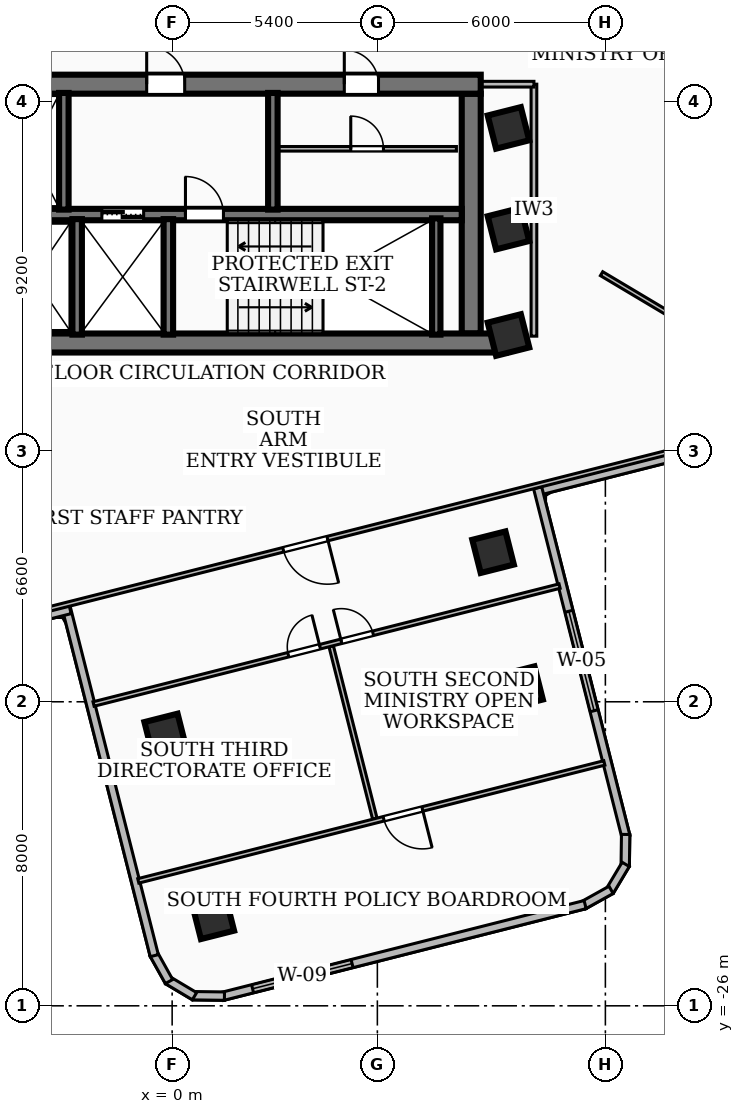
"""IFC4 building model, lengths in metres.
Left out: names, types, materials, properties, quantities, classifications, styles, units other than length and angle.
Written with IfcOpenShell. Run it as: python <this file> out.ifc"""

import sys

from ifc_helpers import new_model, si_unit, direction, frame, frame_2d, origin, origin_2d, place, context, subcontext, project, spatial, rectangle, extrude, element, fill, save


model = new_model("IFC4")
c1 = context("Model", 3, precision=1e-05, world=origin(), true_north=direction((0.0, 1.0)))
c2 = subcontext(c1, "Body", "Model", "MODEL_VIEW")
j1 = project(units=[si_unit("LENGTHUNIT", "METRE"), si_unit("PLANEANGLEUNIT", "RADIAN")], contexts=[c1])
p1 = place(None, origin())
s1 = spatial("IfcSite", under=j1, at=p1, CompositionType="ELEMENT")
p2 = place(p1, origin())
s2 = spatial("IfcBuilding", under=s1, at=p2, CompositionType="ELEMENT")
p3 = place(p2, frame((0.0, 0.0, 127.08)))
s3 = spatial("IfcBuildingStorey", under=s2, at=p3, CompositionType="ELEMENT", Elevation=127.08)
p4 = place(p3, frame((8.78, -8.56, 0.0), z_axis=(0.0, 0.0, 1.0), x_axis=(-1.0, 0.0, 0.0)))
e1 = element("IfcWall", 1, at=p4, inside=s3, PredefinedType="SHEAR", context=c2, shape_type="SweptSolid", body=[
    extrude(rectangle(XDim=17.56, YDim=0.5, at=frame_2d((8.78, 0.0))), origin(), (0.0, 0.0, 1.0), 3.34),
])
p5 = place(p3, frame((-8.12, -1.75, 0.0), z_axis=(0.0, 0.0, 1.0), x_axis=(1.0, 0.0, 0.0)))
e2 = element("IfcWall", 2, at=p5, inside=s3, PredefinedType="SHEAR", context=c2, shape_type="SweptSolid", body=[
    extrude(rectangle(XDim=16.24, YDim=0.5, at=frame_2d((8.12, 0.0))), origin(), (0.0, 0.0, 1.0), 3.34),
])
p6 = place(p5, frame((7.45, 0.0, 0.0)))
e3 = element("IfcOpeningElement", 3, at=p6, cuts=e2, PredefinedType="OPENING", context=c2, shape_type="SweptSolid", body=[
    extrude(rectangle(XDim=1.0, YDim=2.1, at=frame_2d((0.5, 1.05))), frame((0.0, 0.26, 0.0), z_axis=(0.0, -1.0, 0.0), x_axis=(1.0, 0.0, 0.0)), (0.0, 0.0, 1.0), 0.52),
])
p7 = place(p5, frame((12.65, 0.0, 0.0)))
e4 = element("IfcOpeningElement", 4, at=p7, cuts=e2, PredefinedType="OPENING", context=c2, shape_type="SweptSolid", body=[
    extrude(rectangle(XDim=0.9, YDim=2.06, at=frame_2d((0.45, 1.03))), frame((0.0, 0.26, 0.0), z_axis=(0.0, -1.0, 0.0), x_axis=(1.0, 0.0, 0.0)), (0.0, 0.0, 1.0), 0.52),
])
p8 = place(p5, frame((0.565, 0.0, 0.0)))
e5 = element("IfcOpeningElement", 5, at=p8, cuts=e2, PredefinedType="OPENING", context=c2, shape_type="SweptSolid", body=[
    extrude(rectangle(XDim=1.05, YDim=2.15, at=frame_2d((0.525, 1.075))), frame((0.0, 0.26, 0.0), z_axis=(0.0, -1.0, 0.0), x_axis=(1.0, 0.0, 0.0)), (0.0, 0.0, 1.0), 0.52),
])
p9 = place(p5, frame((2.125, 0.0, 0.0)))
e6 = element("IfcOpeningElement", 6, at=p9, cuts=e2, PredefinedType="OPENING", context=c2, shape_type="SweptSolid", body=[
    extrude(rectangle(XDim=1.05, YDim=2.15, at=frame_2d((0.525, 1.075))), frame((0.0, 0.26, 0.0), z_axis=(0.0, -1.0, 0.0), x_axis=(1.0, 0.0, 0.0)), (0.0, 0.0, 1.0), 0.52),
])
p10 = place(p5, frame((3.685, 0.0, 0.0)))
e7 = element("IfcOpeningElement", 7, at=p10, cuts=e2, PredefinedType="OPENING", context=c2, shape_type="SweptSolid", body=[
    extrude(rectangle(XDim=1.05, YDim=2.15, at=frame_2d((0.525, 1.075))), frame((0.0, 0.26, 0.0), z_axis=(0.0, -1.0, 0.0), x_axis=(1.0, 0.0, 0.0)), (0.0, 0.0, 1.0), 0.52),
])
p11 = place(p3, frame((7.87, -2.0, 0.0), z_axis=(0.0, 0.0, 1.0), x_axis=(0.0, -1.0, 0.0)))
e8 = element("IfcWall", 8, at=p11, inside=s3, PredefinedType="SHEAR", context=c2, shape_type="SweptSolid", body=[
    extrude(rectangle(XDim=6.31, YDim=0.5, at=frame_2d((3.155, 0.0))), origin(), (0.0, 0.0, 1.0), 3.34),
])
p12 = place(p3, frame((-7.62, -5.18, 0.0), z_axis=(0.0, 0.0, 1.0), x_axis=(1.0, 0.0, 0.0)))
e9 = element("IfcWall", 9, at=p12, inside=s3, PredefinedType="SOLIDWALL", context=c2, shape_type="SweptSolid", body=[
    extrude(rectangle(XDim=15.24, YDim=0.3, at=frame_2d((7.62, 0.0))), origin(), (0.0, 0.0, 1.0), 3.34),
])
p13 = place(p12, frame((5.77, 0.0, 0.0)))
e10 = element("IfcOpeningElement", 10, at=p13, cuts=e9, PredefinedType="OPENING", context=c2, shape_type="SweptSolid", body=[
    extrude(rectangle(XDim=1.1, YDim=2.15, at=frame_2d((0.55, 1.075))), frame((0.0, 0.16, 0.0), z_axis=(0.0, -1.0, 0.0), x_axis=(1.0, 0.0, 0.0)), (0.0, 0.0, 1.0), 0.32),
])
p14 = place(p12, frame((7.97, 0.0, 0.0)))
e11 = element("IfcOpeningElement", 11, at=p14, cuts=e9, PredefinedType="OPENING", context=c2, shape_type="SweptSolid", body=[
    extrude(rectangle(XDim=1.0, YDim=2.1, at=frame_2d((0.5, 1.05))), frame((0.0, 0.16, 0.0), z_axis=(0.0, -1.0, 0.0), x_axis=(1.0, 0.0, 0.0)), (0.0, 0.0, 1.0), 0.32),
])
p15 = place(p3, frame((6.95, -8.34, 0.0), z_axis=(0.0, 0.0, 1.0), x_axis=(0.0, 1.0, 0.0)))
e12 = element("IfcWall", 12, at=p15, inside=s3, PredefinedType="SOLIDWALL", context=c2, shape_type="SweptSolid", body=[
    extrude(rectangle(XDim=3.06, YDim=0.22, at=frame_2d((1.53, 0.0))), origin(), (0.0, 0.0, 1.0), 3.34),
])
for number, where, z_axis, x_axis in (
    (13, (-0.1, -8.34, 0.0), (0.0, 0.0, 1.0), (0.0, 1.0, 0.0)),
    (14, (-2.5, -8.34, 0.0), (0.0, 0.0, 1.0), (0.0, 1.0, 0.0)),
):
    element("IfcWall", number, at=place(p3, frame(where, z_axis=z_axis, x_axis=x_axis)), inside=s3, PredefinedType="SOLIDWALL", context=c2, shape_type="SweptSolid", body=[
        extrude(rectangle(XDim=3.04, YDim=0.25, at=frame_2d((1.52, 0.0))), origin(), (0.0, 0.0, 1.0), 3.34),
    ])
for number, where, z_axis, x_axis in (
    (15, (-2.85, -5.05, 0.0), (0.0, 0.0, 1.0), (0.0, 1.0, 0.0)),
    (16, (2.65, -5.05, 0.0), (0.0, 0.0, 1.0), (0.0, 1.0, 0.0)),
):
    element("IfcWall", number, at=place(p3, frame(where, z_axis=z_axis, x_axis=x_axis)), inside=s3, PredefinedType="SOLIDWALL", context=c2, shape_type="SweptSolid", body=[
        extrude(rectangle(XDim=3.07, YDim=0.25, at=frame_2d((1.535, 0.0))), origin(), (0.0, 0.0, 1.0), 3.34),
    ])
for number, where, z_axis, x_axis in (
    (17, (8.85, -5.55, 0.0), (0.0, 0.0, 1.0), (0.969, 0.245, 0.0)),
    (18, (8.85, -2.9, 0.0), (0.0, 0.0, 1.0), (0.969, 0.245, 0.0)),
    (19, (8.85, -8.35, 0.0), (0.0, 0.0, 1.0), (0.969, 0.245, 0.0)),
    (20, (-0.183, -18.86, 0.0), (0.0, 0.0, 1.0), (0.969, 0.245, 0.0)),
    (21, (8.445, -14.064, 0.0), (0.0, 0.0, 1.0), (0.969, 0.245, 0.0)),
    (22, (1.083, -23.697, 0.0), (0.0, 0.0, 1.0), (0.969, 0.245, 0.0)),
    (23, (9.208, -17.615, 0.0), (0.0, 0.0, 1.0), (0.969, 0.245, 0.0)),
):
    element("IfcColumn", number, at=place(p3, frame(where, z_axis=z_axis, x_axis=x_axis)), inside=s3, PredefinedType="COLUMN", context=c2, shape_type="SweptSolid", body=[
        extrude(rectangle(XDim=0.9, YDim=0.9, at=origin_2d()), origin(), (0.0, 0.0, 1.0), 3.6),
    ])
p16 = place(p3, frame((16.107, -10.82, 0.0), z_axis=(0.0, 0.0, 1.0), x_axis=(-0.969443674581, -0.245314006561, 0.0)))
e24 = element("IfcWall", 24, at=p16, inside=s3, PredefinedType="SOLIDWALL", context=c2, shape_type="SweptSolid", body=[
    extrude(rectangle(XDim=6.759, YDim=0.22, at=frame_2d((3.379, 0.0))), origin(), (0.0, 0.0, 1.0), 3.34),
])
p17 = place(p3, frame((9.618, -12.371, 0.0), z_axis=(0.0, 0.0, 1.0), x_axis=(0.245401293719, -0.969421582719, 0.0)))
e25 = element("IfcWall", 25, at=p17, inside=s3, PredefinedType="SOLIDWALL", context=c2, shape_type="SweptSolid", body=[
    extrude(rectangle(XDim=9.458, YDim=0.22, at=frame_2d((4.729, 0.0))), origin(), (0.0, 0.0, 1.0), 3.34),
])
p18 = place(p17, frame((3.35, 0.0, 0.85)))
e26 = element("IfcOpeningElement", 26, at=p18, cuts=e25, PredefinedType="OPENING", context=c2, shape_type="SweptSolid", body=[
    extrude(rectangle(XDim=2.7, YDim=1.85, at=frame_2d((1.35, 0.925))), frame((0.0, 0.12, 0.0), z_axis=(0.0, -1.0, 0.0), x_axis=(1.0, 0.0, 0.0)), (0.0, 0.0, 1.0), 0.24),
])
p19 = place(p3, frame((11.933, -21.491, 0.0), z_axis=(0.0, 0.0, 1.0), x_axis=(-0.013172159236, -0.999913243347, 0.0)))
e27 = element("IfcWall", 27, at=p19, inside=s3, PredefinedType="SOLIDWALL", context=c2, shape_type="SweptSolid", body=[
    extrude(rectangle(XDim=0.834, YDim=0.22, at=frame_2d((0.417, 0.0))), origin(), (0.0, 0.0, 1.0), 3.34),
])
p20 = place(p3, frame((11.935, -22.279, 0.0), z_axis=(0.0, 0.0, 1.0), x_axis=(-0.513092073782, -0.858333573747, 0.0)))
e28 = element("IfcWall", 28, at=p20, inside=s3, PredefinedType="SOLIDWALL", context=c2, shape_type="SweptSolid", body=[
    extrude(rectangle(XDim=0.819, YDim=0.22, at=frame_2d((0.409, 0.0))), origin(), (0.0, 0.0, 1.0), 3.34),
])
p21 = place(p3, frame((11.55, -22.949, 0.0), z_axis=(0.0, 0.0, 1.0), x_axis=(-0.873646156661, -0.486561807946, 0.0)))
e29 = element("IfcWall", 29, at=p21, inside=s3, PredefinedType="SOLIDWALL", context=c2, shape_type="SweptSolid", body=[
    extrude(rectangle(XDim=0.834, YDim=0.22, at=frame_2d((0.417, 0.0))), origin(), (0.0, 0.0, 1.0), 3.34),
])
p22 = place(p3, frame((10.867, -23.337, 0.0), z_axis=(0.0, 0.0, 1.0), x_axis=(-0.96944386365, -0.245313259386, 0.0)))
e30 = element("IfcWall", 30, at=p22, inside=s3, PredefinedType="SOLIDWALL", context=c2, shape_type="SweptSolid", body=[
    extrude(rectangle(XDim=9.841, YDim=0.22, at=frame_2d((4.92, 0.0))), origin(), (0.0, 0.0, 1.0), 3.34),
])
p23 = place(p22, frame((6.326, 0.0, 0.85)))
e31 = element("IfcOpeningElement", 31, at=p23, cuts=e30, PredefinedType="OPENING", context=c2, shape_type="SweptSolid", body=[
    extrude(rectangle(XDim=2.7, YDim=1.65, at=frame_2d((1.35, 0.825))), frame((0.0, 0.12, 0.0), z_axis=(0.0, -1.0, 0.0), x_axis=(1.0, 0.0, 0.0)), (0.0, 0.0, 1.0), 0.24),
])
p24 = place(p3, frame((1.376, -25.745, 0.0), z_axis=(0.0, 0.0, 1.0), x_axis=(-0.999909345183, 0.013464821393, 0.0)))
e32 = element("IfcWall", 32, at=p24, inside=s3, PredefinedType="SOLIDWALL", context=c2, shape_type="SweptSolid", body=[
    extrude(rectangle(XDim=0.834, YDim=0.22, at=frame_2d((0.417, 0.0))), origin(), (0.0, 0.0, 1.0), 3.34),
])
p25 = place(p3, frame((0.588, -25.747, 0.0), z_axis=(0.0, 0.0, 1.0), x_axis=(-0.858333573747, 0.513092073782, 0.0)))
e33 = element("IfcWall", 33, at=p25, inside=s3, PredefinedType="SOLIDWALL", context=c2, shape_type="SweptSolid", body=[
    extrude(rectangle(XDim=0.819, YDim=0.22, at=frame_2d((0.409, 0.0))), origin(), (0.0, 0.0, 1.0), 3.34),
])
p26 = place(p3, frame((-0.082, -25.362, 0.0), z_axis=(0.0, 0.0, 1.0), x_axis=(-0.487059722252, 0.87336866612, 0.0)))
e34 = element("IfcWall", 34, at=p26, inside=s3, PredefinedType="SOLIDWALL", context=c2, shape_type="SweptSolid", body=[
    extrude(rectangle(XDim=0.833, YDim=0.22, at=frame_2d((0.417, 0.0))), origin(), (0.0, 0.0, 1.0), 3.34),
])
p27 = place(p3, frame((-0.47, -24.68, 0.0), z_axis=(0.0, 0.0, 1.0), x_axis=(-0.245401293719, 0.969421582719, 0.0)))
e35 = element("IfcWall", 35, at=p27, inside=s3, PredefinedType="SOLIDWALL", context=c2, shape_type="SweptSolid", body=[
    extrude(rectangle(XDim=9.458, YDim=0.22, at=frame_2d((4.729, 0.0))), origin(), (0.0, 0.0, 1.0), 2.57),
])
p28 = place(p3, frame((-2.684, -15.574, 0.0), z_axis=(0.0, 0.0, 1.0), x_axis=(-0.969435490349, -0.245346347134, 0.0)))
e36 = element("IfcWall", 36, at=p28, inside=s3, PredefinedType="SOLIDWALL", context=c2, shape_type="SweptSolid", body=[
    extrude(rectangle(XDim=6.538, YDim=0.22, at=frame_2d((3.269, 0.0))), origin(), (0.0, 0.0, 1.0), 2.57),
])
p29 = place(p3, frame((2.8, -3.45, 0.0), z_axis=(0.0, 0.0, 1.0), x_axis=(1.0, 0.0, 0.0)))
e37 = element("IfcWall", 37, at=p29, inside=s3, PredefinedType="PARTITIONING", context=c2, shape_type="SweptSolid", body=[
    extrude(rectangle(XDim=4.68, YDim=0.12, at=frame_2d((2.34, 0.0))), origin(), (0.0, 0.0, 1.0), 3.34),
])
p30 = place(p29, frame((1.9, 0.0, 0.0)))
e38 = element("IfcOpeningElement", 38, at=p30, cuts=e37, PredefinedType="OPENING", context=c2, shape_type="SweptSolid", body=[
    extrude(rectangle(XDim=0.86, YDim=2.04, at=frame_2d((0.43, 1.02))), frame((0.0, 0.07, 0.0), z_axis=(0.0, -1.0, 0.0), x_axis=(1.0, 0.0, 0.0)), (0.0, 0.0, 1.0), 0.14),
])
p31 = place(p3, frame((9.52, -8.38, 0.0), z_axis=(0.0, 0.0, 1.0), x_axis=(0.0, 1.0, 0.0)))
e39 = element("IfcWall", 39, at=p31, inside=s3, PredefinedType="PARTITIONING", context=c2, shape_type="SweptSolid", body=[
    extrude(rectangle(XDim=6.63, YDim=0.15, at=frame_2d((3.315, 0.0))), origin(), (0.0, 0.0, 1.0), 2.57),
])
p32 = place(p3, frame((7.85, -1.75, 0.0), z_axis=(0.0, 0.0, 1.0), x_axis=(1.0, 0.0, 0.0)))
e40 = element("IfcWall", 40, at=p32, inside=s3, PredefinedType="PARTITIONING", context=c2, shape_type="SweptSolid", body=[
    extrude(rectangle(XDim=1.67, YDim=0.15, at=frame_2d((0.835, 0.0))), origin(), (0.0, 0.0, 1.0), 2.57),
])
p33 = place(p3, frame((11.3, -6.736, 0.0), z_axis=(0.0, 0.0, 1.0), x_axis=(0.858979599017, -0.512009812868, 0.0)))
e41 = element("IfcWall", 41, at=p33, inside=s3, PredefinedType="PARTITIONING", context=c2, shape_type="SweptSolid", body=[
    extrude(rectangle(XDim=6.519, YDim=0.12, at=frame_2d((3.26, 0.0))), origin(), (0.0, 0.0, 1.0), 3.34),
])
p34 = place(p3, frame((11.342, 13.433, 0.0), z_axis=(0.0, 0.0, 1.0), x_axis=(0.24525085526, -0.969459652587, 0.0)))
e42 = element("IfcWall", 42, at=p34, inside=s3, PredefinedType="PARTITIONING", context=c2, shape_type="SweptSolid", body=[
    extrude(rectangle(XDim=20.261, YDim=0.12, at=frame_2d((10.13, 0.0))), origin(), (0.0, 0.0, 1.0), 2.57),
])
p35 = place(p34, frame((9.64, 0.0, 0.0)))
e43 = element("IfcOpeningElement", 43, at=p35, cuts=e42, PredefinedType="OPENING", context=c2, shape_type="SweptSolid", body=[
    extrude(rectangle(XDim=1.2, YDim=2.1, at=frame_2d((0.6, 1.05))), frame((0.0, 0.07, 0.0), z_axis=(0.0, -1.0, 0.0), x_axis=(1.0, 0.0, 0.0)), (0.0, 0.0, 1.0), 0.14),
])
p36 = place(p3, frame((13.433, -11.342, 0.0), z_axis=(0.0, 0.0, 1.0), x_axis=(-0.969459652587, -0.24525085526, 0.0)))
e44 = element("IfcWall", 44, at=p36, inside=s3, PredefinedType="PARTITIONING", context=c2, shape_type="SweptSolid", body=[
    extrude(rectangle(XDim=20.261, YDim=0.12, at=frame_2d((10.13, 0.0))), origin(), (0.0, 0.0, 1.0), 2.57),
])
p37 = place(p36, frame((9.64, 0.0, 0.0)))
e45 = element("IfcOpeningElement", 45, at=p37, cuts=e44, PredefinedType="OPENING", context=c2, shape_type="SweptSolid", body=[
    extrude(rectangle(XDim=1.2, YDim=2.1, at=frame_2d((0.6, 1.05))), frame((0.0, 0.07, 0.0), z_axis=(0.0, -1.0, 0.0), x_axis=(1.0, 0.0, 0.0)), (0.0, 0.0, 1.0), 0.14),
])
p38 = place(p3, frame((4.185, -16.539, 0.0), z_axis=(0.0, 0.0, 1.0), x_axis=(0.245296506438, -0.969448102752, 0.0)))
e46 = element("IfcWall", 46, at=p38, inside=s3, PredefinedType="PARTITIONING", context=c2, shape_type="SweptSolid", body=[
    extrude(rectangle(XDim=4.68, YDim=0.12, at=frame_2d((2.34, 0.0))), origin(), (0.0, 0.0, 1.0), 2.72),
])
p39 = place(p3, frame((-2.068, -18.059, 0.0), z_axis=(0.0, 0.0, 1.0), x_axis=(0.969446010802, 0.245304773986, 0.0)))
e47 = element("IfcWall", 47, at=p39, inside=s3, PredefinedType="PARTITIONING", context=c2, shape_type="SweptSolid", body=[
    extrude(rectangle(XDim=12.65, YDim=0.12, at=frame_2d((6.325, 0.0))), origin(), (0.0, 0.0, 1.0), 2.57),
])
p40 = place(p39, frame((5.285, 0.0, 0.0)))
e48 = element("IfcOpeningElement", 48, at=p40, cuts=e47, PredefinedType="OPENING", context=c2, shape_type="SweptSolid", body=[
    extrude(rectangle(XDim=0.86, YDim=2.04, at=frame_2d((0.43, 1.02))), frame((0.0, 0.07, 0.0), z_axis=(0.0, -1.0, 0.0), x_axis=(1.0, 0.0, 0.0)), (0.0, 0.0, 1.0), 0.14),
])
p41 = place(p39, frame((6.725, 0.0, 0.0)))
e49 = element("IfcOpeningElement", 49, at=p41, cuts=e47, PredefinedType="OPENING", context=c2, shape_type="SweptSolid", body=[
    extrude(rectangle(XDim=0.86, YDim=2.04, at=frame_2d((0.43, 1.02))), frame((0.0, 0.07, 0.0), z_axis=(0.0, -1.0, 0.0), x_axis=(1.0, 0.0, 0.0)), (0.0, 0.0, 1.0), 0.14),
])
p42 = place(p3, frame((11.373, -19.609, 0.0), z_axis=(0.0, 0.0, 1.0), x_axis=(-0.969432297029, -0.245358964534, 0.0)))
e50 = element("IfcWall", 50, at=p42, inside=s3, PredefinedType="PARTITIONING", context=c2, shape_type="SweptSolid", body=[
    extrude(rectangle(XDim=12.651, YDim=0.12, at=frame_2d((6.325, 0.0))), origin(), (0.0, 0.0, 1.0), 2.57),
])
p43 = place(p42, frame((4.94, 0.0, 0.0)))
e51 = element("IfcOpeningElement", 51, at=p43, cuts=e50, PredefinedType="OPENING", context=c2, shape_type="SweptSolid", body=[
    extrude(rectangle(XDim=1.05, YDim=2.08, at=frame_2d((0.525, 1.04))), frame((0.0, 0.07, 0.0), z_axis=(0.0, -1.0, 0.0), x_axis=(1.0, 0.0, 0.0)), (0.0, 0.0, 1.0), 0.14),
])
p44 = place(p18, origin())
e52 = element("IfcWindow", 52, at=p44, inside=s3, PartitioningType="SINGLE_PANEL", PredefinedType="WINDOW", context=c2, shape_type="SweptSolid", body=[
    extrude(rectangle(XDim=2.7, YDim=1.85, at=frame_2d((1.35, 0.925))), frame((0.0, 0.03, 0.0), z_axis=(0.0, -1.0, 0.0), x_axis=(1.0, 0.0, 0.0)), (0.0, 0.0, 1.0), 0.06),
])
fill(e26, e52)
p45 = place(p23, origin())
e53 = element("IfcWindow", 53, at=p45, inside=s3, PartitioningType="SINGLE_PANEL", PredefinedType="WINDOW", context=c2, shape_type="SweptSolid", body=[
    extrude(rectangle(XDim=2.7, YDim=1.65, at=frame_2d((1.35, 0.825))), frame((0.0, 0.03, 0.0), z_axis=(0.0, -1.0, 0.0), x_axis=(1.0, 0.0, 0.0)), (0.0, 0.0, 1.0), 0.06),
])
fill(e31, e53)
p46 = place(p6, origin())
e54 = element("IfcDoor", 54, at=p46, inside=s3, OperationType="SINGLE_SWING_LEFT", PredefinedType="DOOR", context=c2, shape_type="SweptSolid", body=[
    extrude(rectangle(XDim=1.0, YDim=2.1, at=frame_2d((0.5, 1.05))), frame((0.0, 0.025, 0.0), z_axis=(0.0, -1.0, 0.0), x_axis=(1.0, 0.0, 0.0)), (0.0, 0.0, 1.0), 0.05),
])
fill(e3, e54)
p47 = place(p13, origin())
e55 = element("IfcDoor", 55, at=p47, inside=s3, OperationType="DOUBLE_DOOR_SLIDING", PredefinedType="DOOR", context=c2, shape_type="SweptSolid", body=[
    extrude(rectangle(XDim=1.1, YDim=2.15, at=frame_2d((0.55, 1.075))), frame((0.0, 0.025, 0.0), z_axis=(0.0, -1.0, 0.0), x_axis=(1.0, 0.0, 0.0)), (0.0, 0.0, 1.0), 0.05),
])
fill(e10, e55)
p48 = place(p14, origin())
e56 = element("IfcDoor", 56, at=p48, inside=s3, OperationType="SINGLE_SWING_LEFT", PredefinedType="DOOR", context=c2, shape_type="SweptSolid", body=[
    extrude(rectangle(XDim=1.0, YDim=2.1, at=frame_2d((0.5, 1.05))), frame((0.0, 0.025, 0.0), z_axis=(0.0, -1.0, 0.0), x_axis=(1.0, 0.0, 0.0)), (0.0, 0.0, 1.0), 0.05),
])
fill(e11, e56)
p49 = place(p7, origin())
e57 = element("IfcDoor", 57, at=p49, inside=s3, OperationType="SINGLE_SWING_LEFT", PredefinedType="DOOR", context=c2, shape_type="SweptSolid", body=[
    extrude(rectangle(XDim=0.9, YDim=2.06, at=frame_2d((0.45, 1.03))), frame((0.0, 0.025, 0.0), z_axis=(0.0, -1.0, 0.0), x_axis=(1.0, 0.0, 0.0)), (0.0, 0.0, 1.0), 0.05),
])
fill(e4, e57)
p50 = place(p30, origin())
e58 = element("IfcDoor", 58, at=p50, inside=s3, OperationType="SINGLE_SWING_LEFT", PredefinedType="DOOR", context=c2, shape_type="SweptSolid", body=[
    extrude(rectangle(XDim=0.86, YDim=2.04, at=frame_2d((0.43, 1.02))), frame((0.0, 0.025, 0.0), z_axis=(0.0, -1.0, 0.0), x_axis=(1.0, 0.0, 0.0)), (0.0, 0.0, 1.0), 0.05),
])
fill(e38, e58)
p51 = place(p37, origin())
e59 = element("IfcDoor", 59, at=p51, inside=s3, OperationType="SINGLE_SWING_LEFT", PredefinedType="DOOR", context=c2, shape_type="SweptSolid", body=[
    extrude(rectangle(XDim=1.2, YDim=2.1, at=frame_2d((0.6, 1.05))), frame((0.0, 0.025, 0.0), z_axis=(0.0, -1.0, 0.0), x_axis=(1.0, 0.0, 0.0)), (0.0, 0.0, 1.0), 0.05),
])
fill(e45, e59)
p52 = place(p40, origin())
e60 = element("IfcDoor", 60, at=p52, inside=s3, OperationType="SINGLE_SWING_RIGHT", PredefinedType="DOOR", context=c2, shape_type="SweptSolid", body=[
    extrude(rectangle(XDim=0.86, YDim=2.04, at=frame_2d((0.43, 1.02))), frame((0.0, 0.025, 0.0), z_axis=(0.0, -1.0, 0.0), x_axis=(1.0, 0.0, 0.0)), (0.0, 0.0, 1.0), 0.05),
])
fill(e48, e60)
p53 = place(p41, origin())
e61 = element("IfcDoor", 61, at=p53, inside=s3, OperationType="SINGLE_SWING_LEFT", PredefinedType="DOOR", context=c2, shape_type="SweptSolid", body=[
    extrude(rectangle(XDim=0.86, YDim=2.04, at=frame_2d((0.43, 1.02))), frame((0.0, 0.025, 0.0), z_axis=(0.0, -1.0, 0.0), x_axis=(1.0, 0.0, 0.0)), (0.0, 0.0, 1.0), 0.05),
])
fill(e49, e61)
p54 = place(p43, origin())
e62 = element("IfcDoor", 62, at=p54, inside=s3, OperationType="SINGLE_SWING_LEFT", PredefinedType="DOOR", context=c2, shape_type="SweptSolid", body=[
    extrude(rectangle(XDim=1.05, YDim=2.08, at=frame_2d((0.525, 1.04))), frame((0.0, 0.025, 0.0), z_axis=(0.0, -1.0, 0.0), x_axis=(1.0, 0.0, 0.0)), (0.0, 0.0, 1.0), 0.05),
])
fill(e51, e62)
save(model, sys.argv[1])
